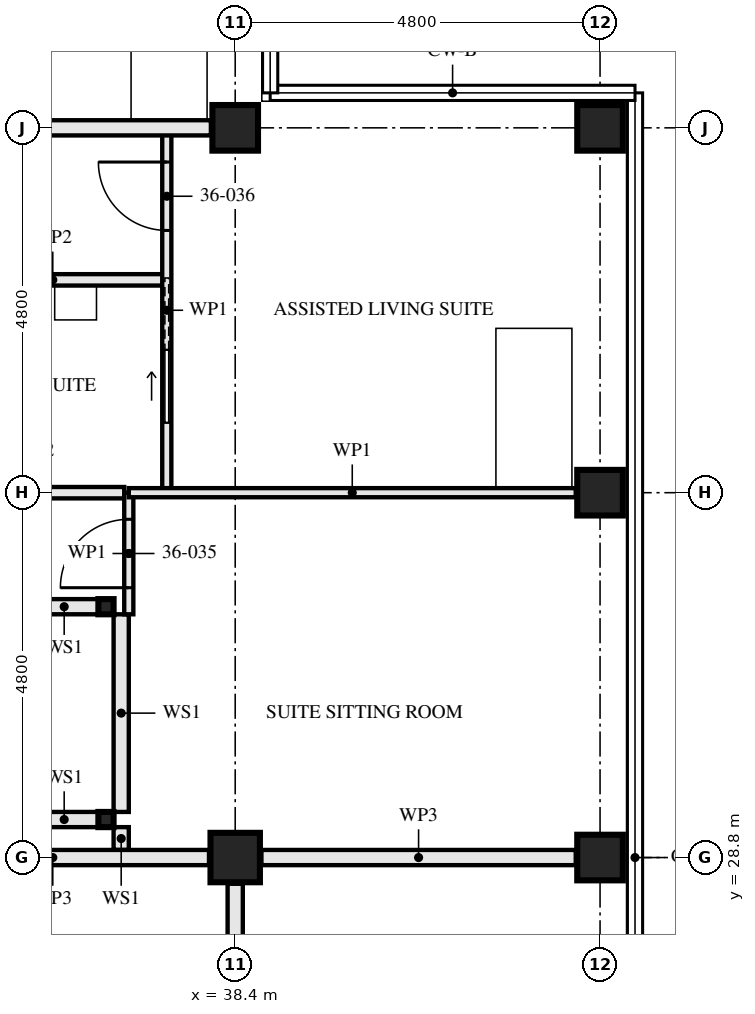
"""IFC4 building model, lengths in metres.
Left out: names, types, materials, properties, quantities, classifications, styles, units other than length and angle.
Written with IfcOpenShell. Run it as: python <this file> out.ifc"""

import sys

from ifc_helpers import new_model, si_unit, direction, frame, frame_2d, origin, origin_2d, place, context, subcontext, project, spatial, rectangle, hollow_rectangle, extrude, element, fill, save


model = new_model("IFC4")
c1 = context("Model", 3, precision=1e-05, world=origin(), true_north=direction((0.0, 1.0)))
c2 = subcontext(c1, "Body", "Model", "MODEL_VIEW")
j1 = project(units=[si_unit("LENGTHUNIT", "METRE"), si_unit("PLANEANGLEUNIT", "RADIAN")], contexts=[c1])
p1 = place(None, origin())
s1 = spatial("IfcSite", under=j1, at=p1, CompositionType="ELEMENT")
p2 = place(p1, origin())
s2 = spatial("IfcBuilding", under=s1, at=p2, CompositionType="ELEMENT")
p3 = place(p2, frame((0.0, 0.0, 133.0)))
s3 = spatial("IfcBuildingStorey", under=s2, at=p3, CompositionType="ELEMENT", Elevation=133.0)
p4 = place(p3, frame((38.4, 28.8, 0.0), z_axis=(0.0, 0.0, 1.0), x_axis=(0.0, 1.0, 0.0)))
e1 = element("IfcColumn", 1, at=p4, inside=s3, PredefinedType="COLUMN", context=c2, shape_type="SweptSolid", body=[
    extrude(hollow_rectangle(XDim=0.65, YDim=0.65, WallThickness=0.05, at=origin_2d()), origin(), (0.0, 0.0, 1.0), 3.5),
])
for number, where, z_axis, x_axis in (
    (2, (38.4, 38.4, 0.0), (0.0, 0.0, 1.0), (0.0, 1.0, 0.0)),
    (3, (43.2, 28.8, 0.0), (0.0, 0.0, 1.0), (0.0, 1.0, 0.0)),
    (4, (43.2, 33.6, 0.0), (0.0, 0.0, 1.0), (1.0, 0.0, 0.0)),
    (5, (43.2, 38.4, 0.0), (0.0, 0.0, 1.0), (0.0, 1.0, 0.0)),
):
    element("IfcColumn", number, at=place(p3, frame(where, z_axis=z_axis, x_axis=x_axis)), inside=s3, PredefinedType="COLUMN", context=c2, shape_type="SweptSolid", body=[
        extrude(hollow_rectangle(XDim=0.6, YDim=0.6, WallThickness=0.08, at=origin_2d()), origin(), (0.0, 0.0, 1.0), 3.5),
    ])
for number, where, z_axis, x_axis in (
    (6, (36.7, 29.3, 0.0), (0.0, 0.0, 1.0), (1.0, 0.0, 0.0)),
    (7, (36.7, 32.1, 0.0), (0.0, 0.0, 1.0), (1.0, 0.0, 0.0)),
):
    element("IfcColumn", number, at=place(p3, frame(where, z_axis=z_axis, x_axis=x_axis)), inside=s3, PredefinedType="COLUMN", context=c2, shape_type="SweptSolid", body=[
        extrude(hollow_rectangle(XDim=0.2, YDim=0.2, WallThickness=0.008, at=origin_2d()), origin(), (0.0, 0.0, 1.0), 3.25),
    ])
p5 = place(p3, frame((38.4, 26.8, 0.0), z_axis=(0.0, 0.0, 1.0), x_axis=(0.0, 1.0, 0.0)))
e8 = element("IfcWall", 8, at=p5, inside=s3, PredefinedType="PARTITIONING", context=c2, shape_type="SweptSolid", body=[
    extrude(rectangle(XDim=1.655, YDim=0.2, at=frame_2d((0.828, 0.0))), origin(), (0.0, 0.0, 1.0), 3.25),
])
for number, where, z_axis, x_axis in (
    (9, (36.6, 29.3, 0.0), (0.0, 0.0, 1.0), (-1.0, 0.0, 0.0)),
    (10, (36.6, 32.1, 0.0), (0.0, 0.0, 1.0), (-1.0, 0.0, 0.0)),
):
    element("IfcWall", number, at=place(p3, frame(where, z_axis=z_axis, x_axis=x_axis)), inside=s3, PredefinedType="SOLIDWALL", context=c2, shape_type="SweptSolid", body=[
        extrude(rectangle(XDim=0.9, YDim=0.2, at=frame_2d((0.45, 0.0))), origin(), (0.0, 0.0, 1.0), 2.94),
    ])
p6 = place(p3, frame((36.9, 28.9, 0.0), z_axis=(0.0, 0.0, 1.0), x_axis=(0.0, 1.0, 0.0)))
e11 = element("IfcWall", 11, at=p6, inside=s3, PredefinedType="SOLIDWALL", context=c2, shape_type="SweptSolid", body=[
    extrude(rectangle(XDim=0.3, YDim=0.2, at=frame_2d((0.15, 0.0))), origin(), (0.0, 0.0, 1.0), 3.25),
])
p7 = place(p3, frame((36.9, 29.4, 0.0), z_axis=(0.0, 0.0, 1.0), x_axis=(0.0, 1.0, 0.0)))
e12 = element("IfcWall", 12, at=p7, inside=s3, PredefinedType="SOLIDWALL", context=c2, shape_type="SweptSolid", body=[
    extrude(rectangle(XDim=2.6, YDim=0.2, at=frame_2d((1.3, 0.0))), origin(), (0.0, 0.0, 1.0), 3.25),
])
p8 = place(p3, frame((37.5, 36.4, 0.0), z_axis=(0.0, 0.0, 1.0), x_axis=(-1.0, 0.0, 0.0)))
e13 = element("IfcWall", 13, at=p8, inside=s3, PredefinedType="PARTITIONING", context=c2, shape_type="SweptSolid", body=[
    extrude(rectangle(XDim=3.0, YDim=0.15, at=frame_2d((1.5, 0.0))), origin(), (0.0, 0.0, 1.0), 3.25),
])
p9 = place(p3, frame((37.0, 32.0, 0.0), z_axis=(0.0, 0.0, 1.0), x_axis=(0.0, 1.0, 0.0)))
e14 = element("IfcWall", 14, at=p9, inside=s3, PredefinedType="PARTITIONING", context=c2, shape_type="SweptSolid", body=[
    extrude(rectangle(XDim=1.6, YDim=0.12, at=frame_2d((0.8, 0.0))), origin(), (0.0, 0.0, 1.0), 3.25),
])
p10 = place(p9, frame((0.35, 0.0, 0.0)))
e15 = element("IfcOpeningElement", 15, at=p10, cuts=e14, PredefinedType="OPENING", context=c2, shape_type="SweptSolid", body=[
    extrude(rectangle(XDim=0.9, YDim=2.1, at=frame_2d((0.45, 1.05))), frame((0.0, 0.071, 0.0), z_axis=(0.0, -1.0, 0.0), x_axis=(1.0, 0.0, 0.0)), (0.0, 0.0, 1.0), 0.141),
])
p11 = place(p3, frame((37.5, 33.6, 0.0), z_axis=(0.0, 0.0, 1.0), x_axis=(0.0, 1.0, 0.0)))
e16 = element("IfcWall", 16, at=p11, inside=s3, PredefinedType="PARTITIONING", context=c2, shape_type="SweptSolid", body=[
    extrude(rectangle(XDim=4.8, YDim=0.12, at=frame_2d((2.4, 0.0))), origin(), (0.0, 0.0, 1.0), 3.25),
])
p12 = place(p11, frame((3.45, 0.0, 0.0)))
e17 = element("IfcOpeningElement", 17, at=p12, cuts=e16, PredefinedType="OPENING", context=c2, shape_type="SweptSolid", body=[
    extrude(rectangle(XDim=0.9, YDim=2.1, at=frame_2d((0.45, 1.05))), frame((0.0, 0.071, 0.0), z_axis=(0.0, -1.0, 0.0), x_axis=(1.0, 0.0, 0.0)), (0.0, 0.0, 1.0), 0.141),
])
p13 = place(p11, frame((0.925, 0.0, 0.0)))
e18 = element("IfcOpeningElement", 18, at=p13, cuts=e16, PredefinedType="OPENING", context=c2, shape_type="SweptSolid", body=[
    extrude(rectangle(XDim=0.95, YDim=2.1, at=frame_2d((0.475, 1.05))), frame((0.0, 0.071, 0.0), z_axis=(0.0, -1.0, 0.0), x_axis=(1.0, 0.0, 0.0)), (0.0, 0.0, 1.0), 0.141),
])
p14 = place(p3, frame((42.88, 33.6, 0.0), z_axis=(0.0, 0.0, 1.0), x_axis=(-1.0, 0.0, 0.0)))
e19 = element("IfcWall", 19, at=p14, inside=s3, PredefinedType="PARTITIONING", context=c2, shape_type="SweptSolid", body=[
    extrude(rectangle(XDim=5.88, YDim=0.12, at=frame_2d((2.94, 0.0))), origin(), (0.0, 0.0, 1.0), 2.04),
])
p15 = place(p3, frame((38.08, 38.4, 0.0), z_axis=(0.0, 0.0, 1.0), x_axis=(-1.0, 0.0, 0.0)))
e20 = element("IfcWall", 20, at=p15, inside=s3, PredefinedType="PARTITIONING", context=c2, shape_type="SweptSolid", body=[
    extrude(rectangle(XDim=7.28, YDim=0.2, at=frame_2d((3.64, 0.0))), origin(), (0.0, 0.0, 1.0), 2.24),
])
p16 = place(p3, frame((42.88, 28.8, 0.0), z_axis=(0.0, 0.0, 1.0), x_axis=(-1.0, 0.0, 0.0)))
e21 = element("IfcWall", 21, at=p16, inside=s3, PredefinedType="PARTITIONING", context=c2, shape_type="SweptSolid", body=[
    extrude(rectangle(XDim=4.135, YDim=0.2, at=frame_2d((2.067, 0.0))), origin(), (0.0, 0.0, 1.0), 2.04),
])
p17 = place(p3, frame((38.055, 28.8, 0.0), z_axis=(0.0, 0.0, 1.0), x_axis=(-1.0, 0.0, 0.0)))
e22 = element("IfcWall", 22, at=p17, inside=s3, PredefinedType="PARTITIONING", context=c2, shape_type="SweptSolid", body=[
    extrude(rectangle(XDim=4.11, YDim=0.2, at=frame_2d((2.055, 0.0))), origin(), (0.0, 0.0, 1.0), 2.04),
])
p18 = place(p3, frame((36.94, 33.6, 0.0), z_axis=(0.0, 0.0, 1.0), x_axis=(-1.0, 0.0, 0.0)))
e23 = element("IfcWall", 23, at=p18, inside=s3, PredefinedType="PARTITIONING", context=c2, shape_type="SweptSolid", body=[
    extrude(rectangle(XDim=2.365, YDim=0.15, at=frame_2d((1.183, 0.0))), origin(), (0.0, 0.0, 1.0), 2.04),
])
p19 = place(p10, origin())
e24 = element("IfcDoor", 24, at=p19, inside=s3, OperationType="SINGLE_SWING_RIGHT", PredefinedType="DOOR", context=c2, shape_type="SweptSolid", body=[
    extrude(rectangle(XDim=0.9, YDim=2.1, at=frame_2d((0.45, 1.05))), frame((0.0, 0.022, 0.0), z_axis=(0.0, -1.0, 0.0), x_axis=(1.0, 0.0, 0.0)), (0.0, 0.0, 1.0), 0.044),
])
fill(e15, e24)
p20 = place(p12, origin())
e25 = element("IfcDoor", 25, at=p20, inside=s3, OperationType="SINGLE_SWING_LEFT", PredefinedType="DOOR", context=c2, shape_type="SweptSolid", body=[
    extrude(rectangle(XDim=0.9, YDim=2.1, at=frame_2d((0.45, 1.05))), frame((0.0, 0.022, 0.0), z_axis=(0.0, -1.0, 0.0), x_axis=(1.0, 0.0, 0.0)), (0.0, 0.0, 1.0), 0.044),
])
fill(e17, e25)
p21 = place(p13, origin())
e26 = element("IfcDoor", 26, at=p21, inside=s3, OperationType="SLIDING_TO_LEFT", PredefinedType="DOOR", context=c2, shape_type="SweptSolid", body=[
    extrude(rectangle(XDim=0.95, YDim=2.1, at=frame_2d((0.475, 1.05))), frame((0.0, 0.022, 0.0), z_axis=(0.0, -1.0, 0.0), x_axis=(1.0, 0.0, 0.0)), (0.0, 0.0, 1.0), 0.044),
])
fill(e18, e26)
save(model, sys.argv[1])
